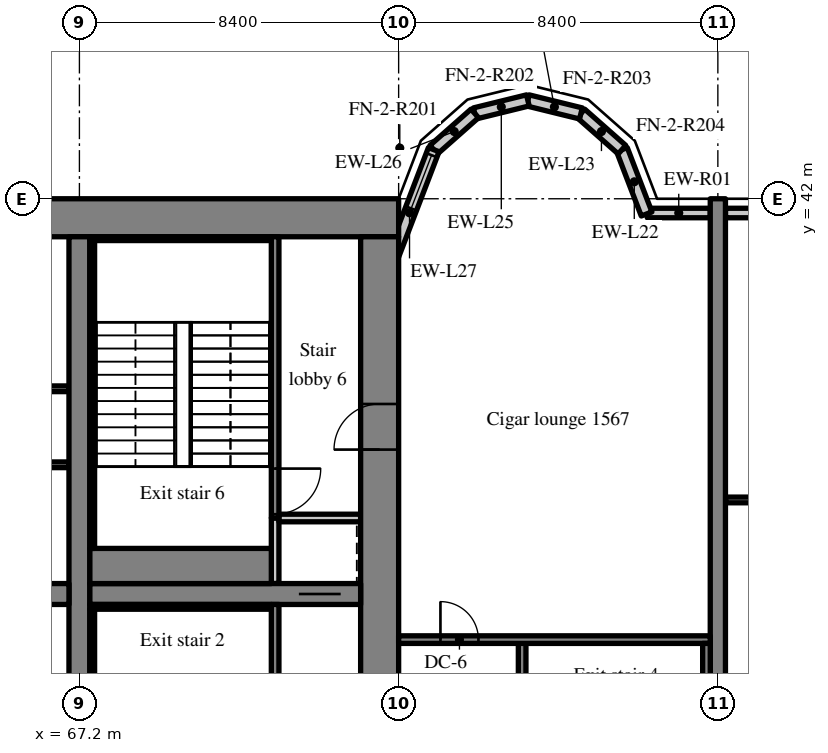
"""IFC4 building model, lengths in metres.
Left out: names, types, materials, properties, quantities, classifications, styles, units other than length and angle.
Written with IfcOpenShell. Run it as: python <this file> out.ifc"""

import sys

from ifc_helpers import new_model, si_unit, direction, frame, frame_2d, origin, place, context, subcontext, project, spatial, rectangle, extrude, source, transform, mapped, element, fill, save


model = new_model("IFC4")
c1 = context("Model", 3, precision=1e-05, world=origin(), true_north=direction((0.0, 1.0)))
c2 = subcontext(c1, "Body", "Model", "MODEL_VIEW")
j1 = project(units=[si_unit("LENGTHUNIT", "METRE"), si_unit("PLANEANGLEUNIT", "RADIAN")], contexts=[c1])
p1 = place(None, origin())
s1 = spatial("IfcSite", under=j1, at=p1, CompositionType="ELEMENT")
p2 = place(p1, origin())
s2 = spatial("IfcBuilding", under=s1, at=p2, CompositionType="ELEMENT")
p3 = place(p2, frame((0.0, 0.0, 65.8)))
s3 = spatial("IfcBuildingStorey", under=s2, at=p3, CompositionType="ELEMENT", Elevation=65.8)
m1 = source(origin(), c2, "Body", "SweptSolid", [
    extrude(rectangle(XDim=50.4, YDim=1.0, at=frame_2d((25.2, 0.0))), origin(), (0.0, 0.0, 1.0), 3.52),
])
p4 = place(p3, frame((25.2, 41.5, 0.0), z_axis=(0.0, 0.0, 1.0), x_axis=(1.0, 0.0, 0.0)))
e1 = element("IfcWall", 1, at=p4, inside=s3, PredefinedType="SHEAR", context=c2, shape_type="MappedRepresentation", body=[
    mapped(m1, transform((0.0, 0.0, 0.0), scale=1.0)),
])
m2 = source(origin(), c2, "Body", "SweptSolid", [
    extrude(rectangle(XDim=18.0, YDim=1.0, at=frame_2d((9.0, 0.0))), origin(), (0.0, 0.0, 1.0), 3.52),
])
p5 = place(p3, frame((75.1, 23.0, 0.0), z_axis=(0.0, 0.0, 1.0), x_axis=(0.0, 1.0, 0.0)))
e2 = element("IfcWall", 2, at=p5, inside=s3, PredefinedType="SHEAR", context=c2, shape_type="MappedRepresentation", body=[
    mapped(m2, transform((0.0, 0.0, 0.0), scale=1.0)),
])
m3 = source(origin(), c2, "Body", "SweptSolid", [
    extrude(rectangle(XDim=1.2, YDim=2.1, at=frame_2d((0.6, 1.05))), frame((0.0, 0.51, 0.0), z_axis=(0.0, -1.0, 0.0), x_axis=(1.0, 0.0, 0.0)), (0.0, 0.0, 1.0), 1.02),
])
p6 = place(p5, frame((12.4, 0.0, 0.0)))
e3 = element("IfcOpeningElement", 3, at=p6, cuts=e2, PredefinedType="OPENING", context=c2, shape_type="MappedRepresentation", body=[
    mapped(m3, transform((0.0, 0.0, 0.0), scale=1.0)),
])
m4 = source(origin(), c2, "Body", "SweptSolid", [
    extrude(rectangle(XDim=18.0, YDim=0.55, at=frame_2d((9.0, 0.0))), origin(), (0.0, 0.0, 1.0), 3.52),
])
p7 = place(p3, frame((67.2, 23.0, 0.0), z_axis=(0.0, 0.0, 1.0), x_axis=(0.0, 1.0, 0.0)))
e4 = element("IfcWall", 4, at=p7, inside=s3, PredefinedType="SHEAR", context=c2, shape_type="MappedRepresentation", body=[
    mapped(m4, transform((0.0, 0.0, 0.0), scale=1.0)),
])
m5 = source(origin(), c2, "Body", "SweptSolid", [
    extrude(rectangle(XDim=16.25, YDim=0.55, at=frame_2d((8.125, 0.0))), origin(), (0.0, 0.0, 1.0), 3.52),
])
p8 = place(p3, frame((50.675, 31.6, 0.0), z_axis=(0.0, 0.0, 1.0), x_axis=(1.0, 0.0, 0.0)))
e5 = element("IfcWall", 5, at=p8, inside=s3, PredefinedType="SHEAR", context=c2, shape_type="MappedRepresentation", body=[
    mapped(m5, transform((0.0, 0.0, 0.0), scale=1.0)),
])
m6 = source(origin(), c2, "Body", "SweptSolid", [
    extrude(rectangle(XDim=1.0, YDim=2.1, at=frame_2d((0.5, 1.05))), frame((0.0, 0.285, 0.0), z_axis=(0.0, -1.0, 0.0), x_axis=(1.0, 0.0, 0.0)), (0.0, 0.0, 1.0), 0.57),
])
p9 = place(p8, frame((0.562, 0.0, 0.0)))
e6 = element("IfcOpeningElement", 6, at=p9, cuts=e5, PredefinedType="OPENING", context=c2, shape_type="MappedRepresentation", body=[
    mapped(m6, transform((0.0, 0.0, 0.0), scale=1.0)),
])
m7 = source(origin(), c2, "Body", "SweptSolid", [
    extrude(rectangle(XDim=7.125, YDim=0.55, at=frame_2d((3.562, 0.0))), origin(), (0.0, 0.0, 1.0), 3.52),
])
p10 = place(p3, frame((67.475, 31.6, 0.0), z_axis=(0.0, 0.0, 1.0), x_axis=(1.0, 0.0, 0.0)))
e7 = element("IfcWall", 7, at=p10, inside=s3, PredefinedType="SHEAR", context=c2, shape_type="MappedRepresentation", body=[
    mapped(m7, transform((0.0, 0.0, 0.0), scale=1.0)),
])
m8 = source(origin(), c2, "Body", "SweptSolid", [
    extrude(rectangle(XDim=1.1, YDim=2.1, at=frame_2d((0.55, 1.05))), frame((0.0, 0.285, 0.0), z_axis=(0.0, -1.0, 0.0), x_axis=(1.0, 0.0, 0.0)), (0.0, 0.0, 1.0), 0.57),
])
p11 = place(p10, frame((5.5, 0.0, 0.0)))
e8 = element("IfcOpeningElement", 8, at=p11, cuts=e7, PredefinedType="OPENING", context=c2, shape_type="MappedRepresentation", body=[
    mapped(m8, transform((0.0, 0.0, 0.0), scale=1.0)),
])
m9 = source(origin(), c2, "Body", "SweptSolid", [
    extrude(rectangle(XDim=20.0, YDim=0.4, at=frame_2d((10.0, 0.0))), origin(), (0.0, 0.0, 1.0), 3.52),
])
p12 = place(p3, frame((84.0, 22.0, 0.0), z_axis=(0.0, 0.0, 1.0), x_axis=(0.0, 1.0, 0.0)))
e9 = element("IfcWall", 9, at=p12, inside=s3, PredefinedType="SHEAR", context=c2, shape_type="MappedRepresentation", body=[
    mapped(m9, transform((0.0, 0.0, 0.0), scale=1.0)),
])
m10 = source(origin(), c2, "Body", "SweptSolid", [
    extrude(rectangle(XDim=1.658, YDim=0.25, at=frame_2d((0.829, 0.0))), origin(), (0.0, 0.0, 1.0), 2.82),
])
p13 = place(p3, frame((83.8, 41.625, 0.0), z_axis=(0.0, 0.0, 1.0), x_axis=(-1.0, 0.0, 0.0)))
e10 = element("IfcWall", 10, at=p13, inside=s3, PredefinedType="SOLIDWALL", context=c2, shape_type="MappedRepresentation", body=[
    mapped(m10, transform((0.0, 0.0, 0.0), scale=1.0)),
])
m11 = source(origin(), c2, "Body", "SweptSolid", [
    extrude(rectangle(XDim=3.6, YDim=0.25, at=frame_2d((1.8, 0.0))), origin(), (0.0, 0.0, 1.0), 2.82),
])
p14 = place(p3, frame((87.8, 41.625, 0.0), z_axis=(0.0, 0.0, 1.0), x_axis=(-1.0, 0.0, 0.0)))
e11 = element("IfcWall", 11, at=p14, inside=s3, PredefinedType="SOLIDWALL", context=c2, shape_type="MappedRepresentation", body=[
    mapped(m11, transform((0.0, 0.0, 0.0), scale=1.0)),
])
m12 = source(origin(), c2, "Body", "SweptSolid", [
    extrude(rectangle(XDim=1.5, YDim=1.5, at=frame_2d((0.75, 0.75))), frame((0.0, 0.135, 0.0), z_axis=(0.0, -1.0, 0.0), x_axis=(1.0, 0.0, 0.0)), (0.0, 0.0, 1.0), 0.27),
])
p15 = place(p14, frame((1.05, 0.0, 0.9)))
e12 = element("IfcOpeningElement", 12, at=p15, cuts=e11, PredefinedType="OPENING", context=c2, shape_type="MappedRepresentation", body=[
    mapped(m12, transform((0.0, 0.0, 0.0), scale=1.0)),
])
m13 = source(origin(), c2, "Body", "SweptSolid", [
    extrude(rectangle(XDim=1.812, YDim=0.3, at=frame_2d((0.906, 0.0))), origin(), (0.0, 0.0, 1.0), 3.52),
])
p16 = place(p3, frame((82.125, 41.6, 0.0), z_axis=(0.0, 0.0, 1.0), x_axis=(-0.357877270961, 0.93376863244, 0.0)))
e13 = element("IfcWall", 13, at=p16, inside=s3, PredefinedType="SOLIDWALL", context=c2, shape_type="MappedRepresentation", body=[
    mapped(m13, transform((0.0, 0.0, 0.0), scale=1.0)),
])
m14 = source(origin(), c2, "Body", "SweptSolid", [
    extrude(rectangle(XDim=1.44, YDim=0.3, at=frame_2d((0.72, 0.0))), origin(), (0.0, 0.0, 1.0), 3.52),
])
p17 = place(p3, frame((81.477, 43.292, 0.0), z_axis=(0.0, 0.0, 1.0), x_axis=(-0.74957555648, 0.661918790432, 0.0)))
e14 = element("IfcWall", 14, at=p17, inside=s3, PredefinedType="SOLIDWALL", context=c2, shape_type="MappedRepresentation", body=[
    mapped(m14, transform((0.0, 0.0, 0.0), scale=1.0)),
])
m15 = source(origin(), c2, "Body", "SweptSolid", [
    extrude(rectangle(XDim=1.439, YDim=0.3, at=frame_2d((0.719, 0.0))), origin(), (0.0, 0.0, 1.0), 3.52),
])
for number, where, z_axis, x_axis in (
    (15, (80.397, 44.245, 0.0), (0.0, 0.0, 1.0), (-0.971, 0.238, 0.0)),
    (16, (79.0, 44.588, 0.0), (0.0, 0.0, 1.0), (-0.971, -0.238, 0.0)),
):
    element("IfcWall", number, at=place(p3, frame(where, z_axis=z_axis, x_axis=x_axis)), inside=s3, PredefinedType="SOLIDWALL", context=c2, shape_type="MappedRepresentation", body=[
        mapped(m15, transform((0.0, 0.0, 0.0), scale=1.0)),
    ])
p18 = place(p3, frame((77.603, 44.245, 0.0), z_axis=(0.0, 0.0, 1.0), x_axis=(-0.74957555648, -0.661918790432, 0.0)))
e17 = element("IfcWall", 17, at=p18, inside=s3, PredefinedType="SOLIDWALL", context=c2, shape_type="MappedRepresentation", body=[
    mapped(m14, transform((0.0, 0.0, 0.0), scale=1.0)),
])
m16 = source(origin(), c2, "Body", "SweptSolid", [
    extrude(rectangle(XDim=3.559, YDim=0.3, at=frame_2d((1.78, 0.0))), origin(), (0.0, 0.0, 1.0), 3.52),
])
p19 = place(p3, frame((76.523, 43.292, 0.0), z_axis=(0.0, 0.0, 1.0), x_axis=(-0.35779745313, -0.933799219604, 0.0)))
e18 = element("IfcWall", 18, at=p19, inside=s3, PredefinedType="SOLIDWALL", context=c2, shape_type="MappedRepresentation", body=[
    mapped(m16, transform((0.0, 0.0, 0.0), scale=1.0)),
])
m17 = source(origin(), c2, "Body", "SweptSolid", [
    extrude(rectangle(XDim=1.5, YDim=2.0, at=frame_2d((0.75, 1.0))), frame((0.0, 0.16, 0.0), z_axis=(0.0, -1.0, 0.0), x_axis=(1.0, 0.0, 0.0)), (0.0, 0.0, 1.0), 0.32),
])
p20 = place(p19, frame((0.156, 0.0, 0.9)))
e19 = element("IfcOpeningElement", 19, at=p20, cuts=e18, PredefinedType="OPENING", context=c2, shape_type="MappedRepresentation", body=[
    mapped(m17, transform((0.0, 0.0, 0.0), scale=1.0)),
])
m18 = source(origin(), c2, "Body", "SweptSolid", [
    extrude(rectangle(XDim=14.125, YDim=0.15, at=frame_2d((7.062, 0.0))), origin(), (0.0, 0.0, 1.0), 3.52),
])
p21 = place(p3, frame((66.925, 35.0, 0.0), z_axis=(0.0, 0.0, 1.0), x_axis=(-1.0, 0.0, 0.0)))
e20 = element("IfcWall", 20, at=p21, inside=s3, PredefinedType="PARTITIONING", context=c2, shape_type="MappedRepresentation", body=[
    mapped(m18, transform((0.0, 0.0, 0.0), scale=1.0)),
])
m19 = source(origin(), c2, "Body", "SweptSolid", [
    extrude(rectangle(XDim=0.9, YDim=2.1, at=frame_2d((0.45, 1.05))), frame((0.0, 0.085, 0.0), z_axis=(0.0, -1.0, 0.0), x_axis=(1.0, 0.0, 0.0)), (0.0, 0.0, 1.0), 0.17),
])
p22 = place(p21, frame((0.955, 0.0, 0.0)))
e21 = element("IfcOpeningElement", 21, at=p22, cuts=e20, PredefinedType="OPENING", context=c2, shape_type="MappedRepresentation", body=[
    mapped(m19, transform((0.0, 0.0, 0.0), scale=1.0)),
])
p23 = place(p21, frame((5.873, 0.0, 0.0)))
e22 = element("IfcOpeningElement", 22, at=p23, cuts=e20, PredefinedType="OPENING", context=c2, shape_type="MappedRepresentation", body=[
    mapped(m19, transform((0.0, 0.0, 0.0), scale=1.0)),
])
p24 = place(p21, frame((11.492, 0.0, 0.0)))
e23 = element("IfcOpeningElement", 23, at=p24, cuts=e20, PredefinedType="OPENING", context=c2, shape_type="MappedRepresentation", body=[
    mapped(m19, transform((0.0, 0.0, 0.0), scale=1.0)),
])
m20 = source(origin(), c2, "Body", "SweptSolid", [
    extrude(rectangle(XDim=16.25, YDim=0.15, at=frame_2d((8.125, 0.0))), origin(), (0.0, 0.0, 1.0), 3.52),
])
p25 = place(p3, frame((66.925, 37.0, 0.0), z_axis=(0.0, 0.0, 1.0), x_axis=(-1.0, 0.0, 0.0)))
e24 = element("IfcWall", 24, at=p25, inside=s3, PredefinedType="PARTITIONING", context=c2, shape_type="MappedRepresentation", body=[
    mapped(m20, transform((0.0, 0.0, 0.0), scale=1.0)),
])
p26 = place(p25, frame((0.769, 0.0, 0.0)))
e25 = element("IfcOpeningElement", 25, at=p26, cuts=e24, PredefinedType="OPENING", context=c2, shape_type="MappedRepresentation", body=[
    mapped(m19, transform((0.0, 0.0, 0.0), scale=1.0)),
])
p27 = place(p25, frame((3.613, 0.0, 0.0)))
e26 = element("IfcOpeningElement", 26, at=p27, cuts=e24, PredefinedType="OPENING", context=c2, shape_type="MappedRepresentation", body=[
    mapped(m19, transform((0.0, 0.0, 0.0), scale=1.0)),
])
p28 = place(p25, frame((9.3, 0.0, 0.0)))
e27 = element("IfcOpeningElement", 27, at=p28, cuts=e24, PredefinedType="OPENING", context=c2, shape_type="MappedRepresentation", body=[
    mapped(m19, transform((0.0, 0.0, 0.0), scale=1.0)),
])
p29 = place(p25, frame((14.581, 0.0, 0.0)))
e28 = element("IfcOpeningElement", 28, at=p29, cuts=e24, PredefinedType="OPENING", context=c2, shape_type="MappedRepresentation", body=[
    mapped(m19, transform((0.0, 0.0, 0.0), scale=1.0)),
])
m21 = source(origin(), c2, "Body", "SweptSolid", [
    extrude(rectangle(XDim=8.325, YDim=0.2, at=frame_2d((4.163, 0.0))), origin(), (0.0, 0.0, 1.0), 3.52),
])
p30 = place(p3, frame((72.35, 23.0, 0.0), z_axis=(0.0, 0.0, 1.0), x_axis=(0.0, 1.0, 0.0)))
e29 = element("IfcWall", 29, at=p30, inside=s3, PredefinedType="SOLIDWALL", context=c2, shape_type="MappedRepresentation", body=[
    mapped(m21, transform((0.0, 0.0, 0.0), scale=1.0)),
])
m22 = source(origin(), c2, "Body", "SweptSolid", [
    extrude(rectangle(XDim=1.2, YDim=2.1, at=frame_2d((0.6, 1.05))), frame((0.0, 0.11, 0.0), z_axis=(0.0, -1.0, 0.0), x_axis=(1.0, 0.0, 0.0)), (0.0, 0.0, 1.0), 0.22),
])
p31 = place(p30, frame((0.6, 0.0, 0.0)))
e30 = element("IfcOpeningElement", 30, at=p31, cuts=e29, PredefinedType="OPENING", context=c2, shape_type="MappedRepresentation", body=[
    mapped(m22, transform((0.0, 0.0, 0.0), scale=1.0)),
])
m23 = source(origin(), c2, "Body", "SweptSolid", [
    extrude(rectangle(XDim=1.725, YDim=0.2, at=frame_2d((0.863, 0.0))), origin(), (0.0, 0.0, 1.0), 3.52),
])
p32 = place(p3, frame((72.35, 31.875, 0.0), z_axis=(0.0, 0.0, 1.0), x_axis=(0.0, 1.0, 0.0)))
e31 = element("IfcWall", 31, at=p32, inside=s3, PredefinedType="SOLIDWALL", context=c2, shape_type="MappedRepresentation", body=[
    mapped(m23, transform((0.0, 0.0, 0.0), scale=1.0)),
])
m24 = source(origin(), c2, "Body", "SweptSolid", [
    extrude(rectangle(XDim=2.15, YDim=0.2, at=frame_2d((1.075, 0.0))), origin(), (0.0, 0.0, 1.0), 3.52),
])
p33 = place(p3, frame((72.45, 33.6, 0.0), z_axis=(0.0, 0.0, 1.0), x_axis=(1.0, 0.0, 0.0)))
e32 = element("IfcWall", 32, at=p33, inside=s3, PredefinedType="SOLIDWALL", context=c2, shape_type="MappedRepresentation", body=[
    mapped(m24, transform((0.0, 0.0, 0.0), scale=1.0)),
])
m25 = source(origin(), c2, "Body", "SweptSolid", [
    extrude(rectangle(XDim=7.4, YDim=0.2, at=frame_2d((3.7, 0.0))), origin(), (0.0, 0.0, 1.0), 3.52),
])
p34 = place(p3, frame((72.35, 33.6, 0.0), z_axis=(0.0, 0.0, 1.0), x_axis=(0.0, 1.0, 0.0)))
e33 = element("IfcWall", 33, at=p34, inside=s3, PredefinedType="SOLIDWALL", context=c2, shape_type="MappedRepresentation", body=[
    mapped(m25, transform((0.0, 0.0, 0.0), scale=1.0)),
])
p35 = place(p34, frame((0.1, 0.0, 0.0)))
e34 = element("IfcOpeningElement", 34, at=p35, cuts=e33, PredefinedType="OPENING", context=c2, shape_type="MappedRepresentation", body=[
    mapped(m22, transform((0.0, 0.0, 0.0), scale=1.0)),
])
m26 = source(origin(), c2, "Body", "SweptSolid", [
    extrude(rectangle(XDim=8.3, YDim=0.2, at=frame_2d((4.15, 0.0))), origin(), (0.0, 0.0, 1.0), 3.52),
])
p36 = place(p3, frame((78.85, 22.1, 0.0), z_axis=(0.0, 0.0, 1.0), x_axis=(0.0, 1.0, 0.0)))
e35 = element("IfcWall", 35, at=p36, inside=s3, PredefinedType="SOLIDWALL", context=c2, shape_type="MappedRepresentation", body=[
    mapped(m26, transform((0.0, 0.0, 0.0), scale=1.0)),
])
p37 = place(p36, frame((0.6, 0.0, 0.0)))
e36 = element("IfcOpeningElement", 36, at=p37, cuts=e35, PredefinedType="OPENING", context=c2, shape_type="MappedRepresentation", body=[
    mapped(m22, transform((0.0, 0.0, 0.0), scale=1.0)),
])
m27 = source(origin(), c2, "Body", "SweptSolid", [
    extrude(rectangle(XDim=8.2, YDim=0.2, at=frame_2d((4.1, 0.0))), origin(), (0.0, 0.0, 1.0), 3.52),
])
p38 = place(p3, frame((83.8, 30.4, 0.0), z_axis=(0.0, 0.0, 1.0), x_axis=(-1.0, 0.0, 0.0)))
e37 = element("IfcWall", 37, at=p38, inside=s3, PredefinedType="SOLIDWALL", context=c2, shape_type="MappedRepresentation", body=[
    mapped(m27, transform((0.0, 0.0, 0.0), scale=1.0)),
])
m28 = source(origin(), c2, "Body", "SweptSolid", [
    extrude(rectangle(XDim=1.0, YDim=2.1, at=frame_2d((0.5, 1.05))), frame((0.0, 0.11, 0.0), z_axis=(0.0, -1.0, 0.0), x_axis=(1.0, 0.0, 0.0)), (0.0, 0.0, 1.0), 0.22),
])
p39 = place(p38, frame((6.1, 0.0, 0.0)))
e38 = element("IfcOpeningElement", 38, at=p39, cuts=e37, PredefinedType="OPENING", context=c2, shape_type="MappedRepresentation", body=[
    mapped(m28, transform((0.0, 0.0, 0.0), scale=1.0)),
])
m29 = source(origin(), c2, "Body", "SweptSolid", [
    extrude(rectangle(XDim=4.775, YDim=0.125, at=frame_2d((2.387, 0.0))), origin(), (0.0, 0.0, 1.0), 3.52),
])
p40 = place(p3, frame((67.475, 31.262, 0.0), z_axis=(0.0, 0.0, 1.0), x_axis=(1.0, 0.0, 0.0)))
e39 = element("IfcWall", 39, at=p40, inside=s3, PredefinedType="SOLIDWALL", context=c2, shape_type="MappedRepresentation", body=[
    mapped(m29, transform((0.0, 0.0, 0.0), scale=1.0)),
])
m30 = source(origin(), c2, "Body", "SweptSolid", [
    extrude(rectangle(XDim=8.1, YDim=0.125, at=frame_2d((4.05, 0.0))), origin(), (0.0, 0.0, 1.0), 3.52),
])
p41 = place(p3, frame((67.537, 23.1, 0.0), z_axis=(0.0, 0.0, 1.0), x_axis=(0.0, 1.0, 0.0)))
e40 = element("IfcWall", 40, at=p41, inside=s3, PredefinedType="SOLIDWALL", context=c2, shape_type="MappedRepresentation", body=[
    mapped(m30, transform((0.0, 0.0, 0.0), scale=1.0)),
])
m31 = source(origin(), c2, "Body", "SweptSolid", [
    extrude(rectangle(XDim=4.775, YDim=0.1, at=frame_2d((2.387, 0.0))), origin(), (0.0, 0.0, 1.0), 3.52),
])
p42 = place(p3, frame((67.475, 40.95, 0.0), z_axis=(0.0, 0.0, 1.0), x_axis=(1.0, 0.0, 0.0)))
e41 = element("IfcWall", 41, at=p42, inside=s3, PredefinedType="SOLIDWALL", context=c2, shape_type="MappedRepresentation", body=[
    mapped(m31, transform((0.0, 0.0, 0.0), scale=1.0)),
])
m32 = source(origin(), c2, "Body", "SweptSolid", [
    extrude(rectangle(XDim=4.775, YDim=0.925, at=frame_2d((2.387, 0.0))), origin(), (0.0, 0.0, 1.0), 3.52),
])
p43 = place(p3, frame((67.475, 32.337, 0.0), z_axis=(0.0, 0.0, 1.0), x_axis=(1.0, 0.0, 0.0)))
e42 = element("IfcWall", 42, at=p43, inside=s3, PredefinedType="SOLIDWALL", context=c2, shape_type="MappedRepresentation", body=[
    mapped(m32, transform((0.0, 0.0, 0.0), scale=1.0)),
])
p44 = place(p3, frame((67.537, 32.8, 0.0), z_axis=(0.0, 0.0, 1.0), x_axis=(0.0, 1.0, 0.0)))
e43 = element("IfcWall", 43, at=p44, inside=s3, PredefinedType="SOLIDWALL", context=c2, shape_type="MappedRepresentation", body=[
    mapped(m30, transform((0.0, 0.0, 0.0), scale=1.0)),
])
m33 = source(origin(), c2, "Body", "SweptSolid", [
    extrude(rectangle(XDim=8.1, YDim=0.2, at=frame_2d((4.05, 0.0))), origin(), (0.0, 0.0, 1.0), 3.52),
])
p45 = place(p3, frame((83.7, 22.2, 0.0), z_axis=(0.0, 0.0, 1.0), x_axis=(0.0, 1.0, 0.0)))
e44 = element("IfcWall", 44, at=p45, inside=s3, PredefinedType="SOLIDWALL", context=c2, shape_type="MappedRepresentation", body=[
    mapped(m33, transform((0.0, 0.0, 0.0), scale=1.0)),
])
m34 = source(origin(), c2, "Body", "SweptSolid", [
    extrude(rectangle(XDim=8.0, YDim=0.15, at=frame_2d((4.0, 0.0))), origin(), (0.0, 0.0, 1.0), 3.52),
])
p46 = place(p3, frame((84.2, 34.075, 0.0), z_axis=(0.0, 0.0, 1.0), x_axis=(1.0, 0.0, 0.0)))
e45 = element("IfcWall", 45, at=p46, inside=s3, PredefinedType="PARTITIONING", context=c2, shape_type="MappedRepresentation", body=[
    mapped(m34, transform((0.0, 0.0, 0.0), scale=1.0)),
])
m35 = source(origin(), c2, "Body", "SweptSolid", [
    extrude(rectangle(XDim=1.0, YDim=2.1, at=frame_2d((0.5, 1.05))), frame((0.0, 0.085, 0.0), z_axis=(0.0, -1.0, 0.0), x_axis=(1.0, 0.0, 0.0)), (0.0, 0.0, 1.0), 0.17),
])
p47 = place(p46, frame((0.7, 0.0, 0.0)))
e46 = element("IfcOpeningElement", 46, at=p47, cuts=e45, PredefinedType="OPENING", context=c2, shape_type="MappedRepresentation", body=[
    mapped(m35, transform((0.0, 0.0, 0.0), scale=1.0)),
])
m36 = source(origin(), c2, "Body", "SweptSolid", [
    extrude(rectangle(XDim=1.5, YDim=2.0, at=frame_2d((0.75, 1.0))), frame((0.0, 0.03, 0.0), z_axis=(0.0, -1.0, 0.0), x_axis=(1.0, 0.0, 0.0)), (0.0, 0.0, 1.0), 0.06),
])
p48 = place(p20, origin())
e47 = element("IfcWindow", 47, at=p48, inside=s3, PartitioningType="SINGLE_PANEL", PredefinedType="WINDOW", context=c2, shape_type="MappedRepresentation", body=[
    mapped(m36, transform((0.0, 0.0, 0.0), scale=1.0)),
])
fill(e19, e47)
m37 = source(origin(), c2, "Body", "SweptSolid", [
    extrude(rectangle(XDim=1.1, YDim=2.1, at=frame_2d((0.55, 1.05))), frame((0.0, 0.025, 0.0), z_axis=(0.0, -1.0, 0.0), x_axis=(1.0, 0.0, 0.0)), (0.0, 0.0, 1.0), 0.05),
])
p49 = place(p11, origin())
e48 = element("IfcDoor", 48, at=p49, inside=s3, OperationType="SLIDING_TO_RIGHT", PredefinedType="DOOR", context=c2, shape_type="MappedRepresentation", body=[
    mapped(m37, transform((0.0, 0.0, 0.0), scale=1.0)),
])
fill(e8, e48)
m38 = source(origin(), c2, "Body", "SweptSolid", [
    extrude(rectangle(XDim=1.2, YDim=2.1, at=frame_2d((0.6, 1.05))), frame((0.0, 0.025, 0.0), z_axis=(0.0, -1.0, 0.0), x_axis=(1.0, 0.0, 0.0)), (0.0, 0.0, 1.0), 0.05),
])
p50 = place(p35, origin())
e49 = element("IfcDoor", 49, at=p50, inside=s3, OperationType="SINGLE_SWING_RIGHT", PredefinedType="DOOR", context=c2, shape_type="MappedRepresentation", body=[
    mapped(m38, transform((0.0, 0.0, 0.0), scale=1.0)),
])
fill(e34, e49)
p51 = place(p6, origin())
e50 = element("IfcDoor", 50, at=p51, inside=s3, OperationType="SINGLE_SWING_LEFT", PredefinedType="DOOR", context=c2, shape_type="MappedRepresentation", body=[
    mapped(m38, transform((0.0, 0.0, 0.0), scale=1.0)),
])
fill(e3, e50)
m39 = source(origin(), c2, "Body", "SweptSolid", [
    extrude(rectangle(XDim=1.0, YDim=2.1, at=frame_2d((0.5, 1.05))), frame((0.0, 0.025, 0.0), z_axis=(0.0, -1.0, 0.0), x_axis=(1.0, 0.0, 0.0)), (0.0, 0.0, 1.0), 0.05),
])
p52 = place(p39, origin())
e51 = element("IfcDoor", 51, at=p52, inside=s3, OperationType="SINGLE_SWING_RIGHT", PredefinedType="DOOR", context=c2, shape_type="MappedRepresentation", body=[
    mapped(m39, transform((0.0, 0.0, 0.0), scale=1.0)),
])
fill(e38, e51)
save(model, sys.argv[1])
